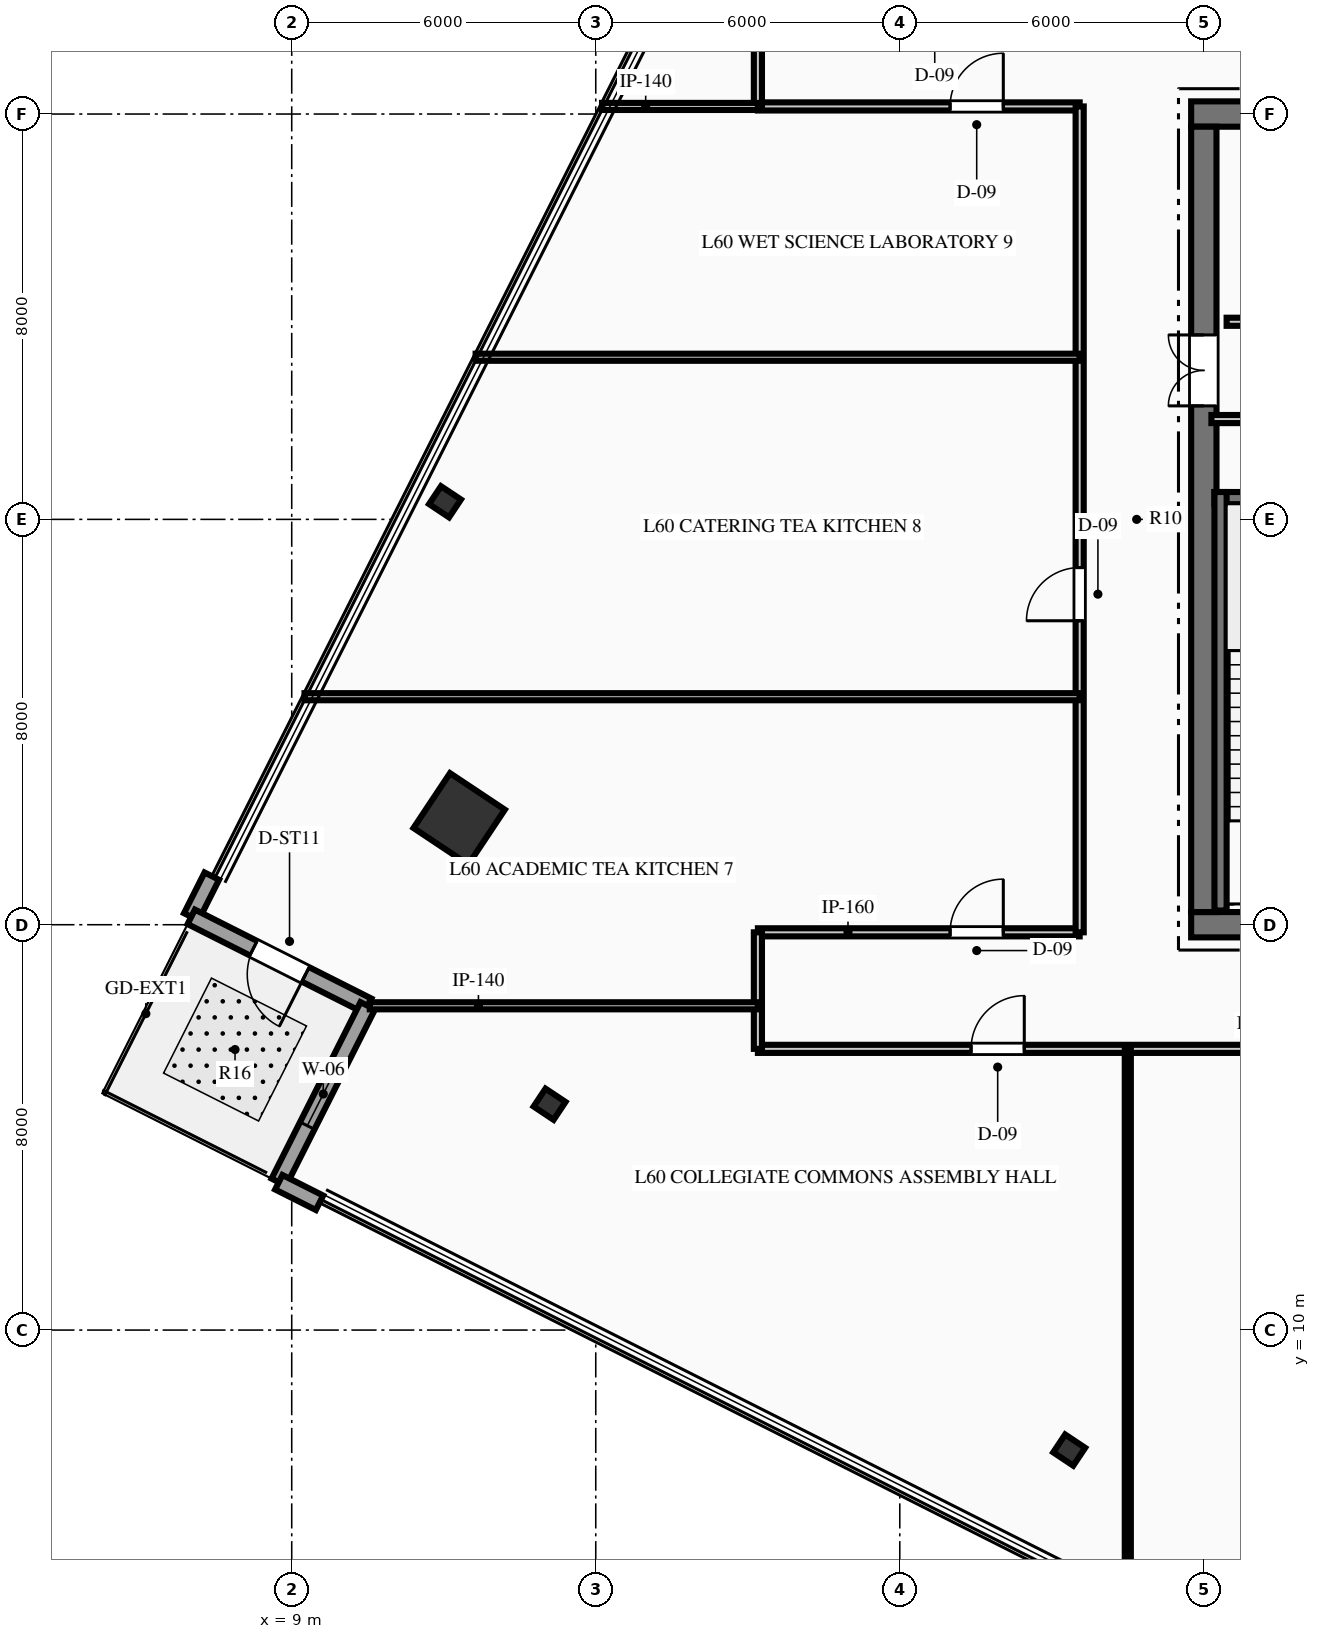
"""IFC4 building model, lengths in metres.
Left out: names, types, materials, properties, quantities, classifications, styles, units other than length and angle.
Written with IfcOpenShell. Run it as: python <this file> out.ifc"""

import sys

from ifc_helpers import new_model, si_unit, direction, frame, frame_2d, origin, origin_2d, place, context, subcontext, project, spatial, rectangle, hollow_rectangle, i_section, extrude, element, fill, save


model = new_model("IFC4")
c1 = context("Model", 3, precision=1e-05, world=origin(), true_north=direction((0.0, 1.0)))
c2 = subcontext(c1, "Body", "Model", "MODEL_VIEW")
j1 = project(units=[si_unit("LENGTHUNIT", "METRE"), si_unit("PLANEANGLEUNIT", "RADIAN")], contexts=[c1])
p1 = place(None, origin())
s1 = spatial("IfcSite", under=j1, at=p1, CompositionType="ELEMENT")
p2 = place(p1, origin())
s2 = spatial("IfcBuilding", under=s1, at=p2, CompositionType="ELEMENT")
p3 = place(p2, frame((0.0, 0.0, 239.7)))
s3 = spatial("IfcBuildingStorey", under=s2, at=p3, CompositionType="ELEMENT", Elevation=239.7)
p4 = place(p3, frame((26.75, 18.0, 0.0), z_axis=(0.0, 0.0, 1.0), x_axis=(1.0, 0.0, 0.0)))
e1 = element("IfcWall", 1, at=p4, inside=s3, PredefinedType="SHEAR", context=c2, shape_type="SweptSolid", body=[
    extrude(rectangle(XDim=18.5, YDim=0.5, at=frame_2d((9.25, 0.0))), origin(), (0.0, 0.0, 1.0), 4.5),
])
p5 = place(p4, frame((7.35, 0.0, 0.0)))
e2 = element("IfcOpeningElement", 2, at=p5, cuts=e1, PredefinedType="OPENING", context=c2, shape_type="SweptSolid", body=[
    extrude(rectangle(XDim=1.1, YDim=2.15, at=frame_2d((0.55, 1.075))), frame((0.0, 0.26, 0.0), z_axis=(0.0, -1.0, 0.0), x_axis=(1.0, 0.0, 0.0)), (0.0, 0.0, 1.0), 0.52),
])
p6 = place(p4, frame((10.05, 0.0, 0.0)))
e3 = element("IfcOpeningElement", 3, at=p6, cuts=e1, PredefinedType="OPENING", context=c2, shape_type="SweptSolid", body=[
    extrude(rectangle(XDim=1.1, YDim=2.15, at=frame_2d((0.55, 1.075))), frame((0.0, 0.26, 0.0), z_axis=(0.0, -1.0, 0.0), x_axis=(1.0, 0.0, 0.0)), (0.0, 0.0, 1.0), 0.52),
])
p7 = place(p3, frame((26.75, 34.0, 0.0), z_axis=(0.0, 0.0, 1.0), x_axis=(1.0, 0.0, 0.0)))
e4 = element("IfcWall", 4, at=p7, inside=s3, PredefinedType="SHEAR", context=c2, shape_type="SweptSolid", body=[
    extrude(rectangle(XDim=18.5, YDim=0.5, at=frame_2d((9.25, 0.0))), origin(), (0.0, 0.0, 1.0), 4.5),
])
p8 = place(p7, frame((13.935, 0.0, 0.0)))
e5 = element("IfcOpeningElement", 5, at=p8, cuts=e4, PredefinedType="OPENING", context=c2, shape_type="SweptSolid", body=[
    extrude(rectangle(XDim=1.1, YDim=2.15, at=frame_2d((0.55, 1.075))), frame((0.0, 0.26, 0.0), z_axis=(0.0, -1.0, 0.0), x_axis=(1.0, 0.0, 0.0)), (0.0, 0.0, 1.0), 0.52),
])
p9 = place(p7, frame((16.185, 0.0, 0.0)))
e6 = element("IfcOpeningElement", 6, at=p9, cuts=e4, PredefinedType="OPENING", context=c2, shape_type="SweptSolid", body=[
    extrude(rectangle(XDim=1.1, YDim=2.15, at=frame_2d((0.55, 1.075))), frame((0.0, 0.26, 0.0), z_axis=(0.0, -1.0, 0.0), x_axis=(1.0, 0.0, 0.0)), (0.0, 0.0, 1.0), 0.52),
])
p10 = place(p3, frame((27.0, 18.25, 0.0), z_axis=(0.0, 0.0, 1.0), x_axis=(0.0, 1.0, 0.0)))
e7 = element("IfcWall", 7, at=p10, inside=s3, PredefinedType="SHEAR", context=c2, shape_type="SweptSolid", body=[
    extrude(rectangle(XDim=15.5, YDim=0.5, at=frame_2d((7.75, 0.0))), origin(), (0.0, 0.0, 1.0), 4.5),
])
p11 = place(p10, frame((9.99, 0.0, 0.0)))
e8 = element("IfcOpeningElement", 8, at=p11, cuts=e7, PredefinedType="OPENING", context=c2, shape_type="SweptSolid", body=[
    extrude(rectangle(XDim=1.4, YDim=2.2, at=frame_2d((0.7, 1.1))), frame((0.0, 0.26, 0.0), z_axis=(0.0, -1.0, 0.0), x_axis=(1.0, 0.0, 0.0)), (0.0, 0.0, 1.0), 0.52),
])
p12 = place(p3, frame((27.21, 26.42, 0.0), z_axis=(0.0, 0.0, 1.0), x_axis=(1.0, 0.0, 0.0)))
e9 = element("IfcWall", 9, at=p12, inside=s3, PredefinedType="SHEAR", context=c2, shape_type="SweptSolid", body=[
    extrude(rectangle(XDim=3.98, YDim=0.24, at=frame_2d((1.99, 0.0))), origin(), (0.0, 0.0, 1.0), 4.5),
])
p13 = place(p3, frame((27.33, 18.28, 0.0), z_axis=(0.0, 0.0, 1.0), x_axis=(0.0, 1.0, 0.0)))
e10 = element("IfcWall", 10, at=p13, inside=s3, PredefinedType="SHEAR", context=c2, shape_type="SweptSolid", body=[
    extrude(rectangle(XDim=8.26, YDim=0.24, at=frame_2d((4.13, 0.0))), origin(), (0.0, 0.0, 1.0), 4.5),
])
p14 = place(p3, frame((12.305, 20.09, 0.0), z_axis=(0.0, 0.0, 1.0), x_axis=(0.554118199338, 0.832437998389, 0.0)))
e11 = element("IfcColumn", 11, at=p14, inside=s3, PredefinedType="COLUMN", context=c2, shape_type="SweptSolid", body=[
    extrude(hollow_rectangle(XDim=1.3, YDim=1.3, WallThickness=0.06, at=origin_2d()), origin(), (0.0, 0.0, 1.0), 4.5),
])
for number, where, z_axis, x_axis in (
    (12, (12.025, 26.347, 0.0), (0.0, 0.0, 1.0), (0.554, 0.832, 0.0)),
    (13, (14.088, 14.458, 0.0), (0.0, 0.0, 1.0), (0.554, 0.832, 0.0)),
    (14, (24.343, 7.631, 0.0), (0.0, 0.0, 1.0), (0.554, 0.832, 0.0)),
):
    element("IfcColumn", number, at=place(p3, frame(where, z_axis=z_axis, x_axis=x_axis)), inside=s3, PredefinedType="COLUMN", context=c2, shape_type="SweptSolid", body=[
        extrude(i_section(OverallWidth=0.424, OverallDepth=0.474, WebThickness=0.048, FlangeThickness=0.077, at=origin_2d()), origin(), (0.0, 0.0, 1.0), 4.5),
    ])
p15 = place(p3, frame((7.017, 18.156, 0.0), z_axis=(0.0, 0.0, 1.0), x_axis=(0.45024883958, 0.892903120421, 0.0)))
e15 = element("IfcWall", 15, at=p15, inside=s3, PredefinedType="STANDARD", context=c2, shape_type="SweptSolid", body=[
    extrude(rectangle(XDim=0.9, YDim=0.32, at=frame_2d((0.45, 0.0))), origin(), (0.0, 0.0, 1.0), 4.1),
])
p16 = place(p3, frame((10.5, 16.4, 0.0), z_axis=(0.0, 0.0, 1.0), x_axis=(-0.892982765682, 0.450090857711, 0.0)))
e16 = element("IfcWall", 16, at=p16, inside=s3, PredefinedType="STANDARD", context=c2, shape_type="SweptSolid", body=[
    extrude(rectangle(XDim=3.9, YDim=0.32, at=frame_2d((1.95, 0.0))), origin(), (0.0, 0.0, 1.0), 4.1),
])
p17 = place(p16, frame((1.375, 0.0, 0.0)))
e17 = element("IfcOpeningElement", 17, at=p17, cuts=e16, PredefinedType="OPENING", context=c2, shape_type="SweptSolid", body=[
    extrude(rectangle(XDim=1.15, YDim=2.2, at=frame_2d((0.575, 1.1))), frame((0.0, 0.17, 0.0), z_axis=(0.0, -1.0, 0.0), x_axis=(1.0, 0.0, 0.0)), (0.0, 0.0, 1.0), 0.34),
])
p18 = place(p3, frame((8.745, 12.917, 0.0), z_axis=(0.0, 0.0, 1.0), x_axis=(0.450090857711, 0.892982765682, 0.0)))
e18 = element("IfcWall", 18, at=p18, inside=s3, PredefinedType="STANDARD", context=c2, shape_type="SweptSolid", body=[
    extrude(rectangle(XDim=3.9, YDim=0.32, at=frame_2d((1.95, 0.0))), origin(), (0.0, 0.0, 1.0), 4.1),
])
p19 = place(p18, frame((1.25, 0.0, 0.85)))
e19 = element("IfcOpeningElement", 19, at=p19, cuts=e18, PredefinedType="OPENING", context=c2, shape_type="SweptSolid", body=[
    extrude(rectangle(XDim=1.4, YDim=2.0, at=frame_2d((0.7, 1.0))), frame((0.0, 0.17, 0.0), z_axis=(0.0, -1.0, 0.0), x_axis=(1.0, 0.0, 0.0)), (0.0, 0.0, 1.0), 0.34),
])
p20 = place(p3, frame((9.548, 12.512, 0.0), z_axis=(0.0, 0.0, 1.0), x_axis=(-0.893012151464, 0.450032551421, 0.0)))
e20 = element("IfcWall", 20, at=p20, inside=s3, PredefinedType="STANDARD", context=c2, shape_type="SweptSolid", body=[
    extrude(rectangle(XDim=0.9, YDim=0.32, at=frame_2d((0.45, 0.0))), origin(), (0.0, 0.0, 1.0), 4.1),
])
p21 = place(p3, frame((27.15, 27.98, 0.0), z_axis=(0.0, 0.0, 1.0), x_axis=(1.0, 0.0, 0.0)))
e21 = element("IfcWall", 21, at=p21, inside=s3, PredefinedType="PARTITIONING", context=c2, shape_type="SweptSolid", body=[
    extrude(rectangle(XDim=4.05, YDim=0.16, at=frame_2d((2.025, 0.0))), origin(), (0.0, 0.0, 1.0), 4.1),
])
p22 = place(p21, frame((1.625, 0.0, 0.0)))
e22 = element("IfcOpeningElement", 22, at=p22, cuts=e21, PredefinedType="OPENING", context=c2, shape_type="SweptSolid", body=[
    extrude(rectangle(XDim=0.95, YDim=2.15, at=frame_2d((0.475, 1.075))), frame((0.0, 0.09, 0.0), z_axis=(0.0, -1.0, 0.0), x_axis=(1.0, 0.0, 0.0)), (0.0, 0.0, 1.0), 0.18),
])
p23 = place(p3, frame((27.45, 29.9, 0.0), z_axis=(0.0, 0.0, 1.0), x_axis=(1.0, 0.0, 0.0)))
e23 = element("IfcWall", 23, at=p23, inside=s3, PredefinedType="PARTITIONING", context=c2, shape_type="SweptSolid", body=[
    extrude(rectangle(XDim=4.43, YDim=0.16, at=frame_2d((2.215, 0.0))), origin(), (0.0, 0.0, 1.0), 4.1),
])
p24 = place(p23, frame((1.675, 0.0, 0.0)))
e24 = element("IfcOpeningElement", 24, at=p24, cuts=e23, PredefinedType="OPENING", context=c2, shape_type="SweptSolid", body=[
    extrude(rectangle(XDim=0.95, YDim=2.15, at=frame_2d((0.475, 1.075))), frame((0.0, 0.09, 0.0), z_axis=(0.0, -1.0, 0.0), x_axis=(1.0, 0.0, 0.0)), (0.0, 0.0, 1.0), 0.18),
])
p25 = place(p3, frame((18.2, 15.55, 0.0), z_axis=(0.0, 0.0, 1.0), x_axis=(1.0, 0.0, 0.0)))
e25 = element("IfcWall", 25, at=p25, inside=s3, PredefinedType="PARTITIONING", context=c2, shape_type="SweptSolid", body=[
    extrude(rectangle(XDim=35.6, YDim=0.16, at=frame_2d((17.8, 0.0))), origin(), (0.0, 0.0, 1.0), 2.595),
])
p26 = place(p25, frame((22.45, 0.0, 0.0)))
e26 = element("IfcOpeningElement", 26, at=p26, cuts=e25, PredefinedType="OPENING", context=c2, shape_type="SweptSolid", body=[
    extrude(rectangle(XDim=0.9, YDim=2.15, at=frame_2d((0.45, 1.075))), frame((0.0, 0.09, 0.0), z_axis=(0.0, -1.0, 0.0), x_axis=(1.0, 0.0, 0.0)), (0.0, 0.0, 1.0), 0.18),
])
p27 = place(p25, frame((24.75, 0.0, 0.0)))
e27 = element("IfcOpeningElement", 27, at=p27, cuts=e25, PredefinedType="OPENING", context=c2, shape_type="SweptSolid", body=[
    extrude(rectangle(XDim=0.9, YDim=2.15, at=frame_2d((0.45, 1.075))), frame((0.0, 0.09, 0.0), z_axis=(0.0, -1.0, 0.0), x_axis=(1.0, 0.0, 0.0)), (0.0, 0.0, 1.0), 0.18),
])
p28 = place(p25, frame((27.0, 0.0, 0.0)))
e28 = element("IfcOpeningElement", 28, at=p28, cuts=e25, PredefinedType="OPENING", context=c2, shape_type="SweptSolid", body=[
    extrude(rectangle(XDim=1.0, YDim=2.15, at=frame_2d((0.5, 1.075))), frame((0.0, 0.09, 0.0), z_axis=(0.0, -1.0, 0.0), x_axis=(1.0, 0.0, 0.0)), (0.0, 0.0, 1.0), 0.18),
])
p29 = place(p25, frame((4.207, 0.0, 0.0)))
e29 = element("IfcOpeningElement", 29, at=p29, cuts=e25, PredefinedType="OPENING", context=c2, shape_type="SweptSolid", body=[
    extrude(rectangle(XDim=1.05, YDim=2.15, at=frame_2d((0.525, 1.075))), frame((0.0, 0.09, 0.0), z_axis=(0.0, -1.0, 0.0), x_axis=(1.0, 0.0, 0.0)), (0.0, 0.0, 1.0), 0.18),
])
p30 = place(p25, frame((16.707, 0.0, 0.0)))
e30 = element("IfcOpeningElement", 30, at=p30, cuts=e25, PredefinedType="OPENING", context=c2, shape_type="SweptSolid", body=[
    extrude(rectangle(XDim=1.05, YDim=2.15, at=frame_2d((0.525, 1.075))), frame((0.0, 0.09, 0.0), z_axis=(0.0, -1.0, 0.0), x_axis=(1.0, 0.0, 0.0)), (0.0, 0.0, 1.0), 0.18),
])
p31 = place(p3, frame((18.2, 17.85, 0.0), z_axis=(0.0, 0.0, 1.0), x_axis=(1.0, 0.0, 0.0)))
e31 = element("IfcWall", 31, at=p31, inside=s3, PredefinedType="PARTITIONING", context=c2, shape_type="SweptSolid", body=[
    extrude(rectangle(XDim=6.35, YDim=0.16, at=frame_2d((3.175, 0.0))), origin(), (0.0, 0.0, 1.0), 4.1),
])
p32 = place(p31, frame((3.793, 0.0, 0.0)))
e32 = element("IfcOpeningElement", 32, at=p32, cuts=e31, PredefinedType="OPENING", context=c2, shape_type="SweptSolid", body=[
    extrude(rectangle(XDim=1.05, YDim=2.15, at=frame_2d((0.525, 1.075))), frame((0.0, 0.09, 0.0), z_axis=(0.0, -1.0, 0.0), x_axis=(1.0, 0.0, 0.0)), (0.0, 0.0, 1.0), 0.18),
])
p33 = place(p3, frame((18.2, 34.15, 0.0), z_axis=(0.0, 0.0, 1.0), x_axis=(1.0, 0.0, 0.0)))
e33 = element("IfcWall", 33, at=p33, inside=s3, PredefinedType="PARTITIONING", context=c2, shape_type="SweptSolid", body=[
    extrude(rectangle(XDim=6.35, YDim=0.16, at=frame_2d((3.175, 0.0))), origin(), (0.0, 0.0, 1.0), 4.1),
])
p34 = place(p33, frame((3.793, 0.0, 0.0)))
e34 = element("IfcOpeningElement", 34, at=p34, cuts=e33, PredefinedType="OPENING", context=c2, shape_type="SweptSolid", body=[
    extrude(rectangle(XDim=1.05, YDim=2.15, at=frame_2d((0.525, 1.075))), frame((0.0, 0.09, 0.0), z_axis=(0.0, -1.0, 0.0), x_axis=(1.0, 0.0, 0.0)), (0.0, 0.0, 1.0), 0.18),
])
p35 = place(p3, frame((24.55, 17.85, 0.0), z_axis=(0.0, 0.0, 1.0), x_axis=(0.0, 1.0, 0.0)))
e35 = element("IfcWall", 35, at=p35, inside=s3, PredefinedType="PARTITIONING", context=c2, shape_type="SweptSolid", body=[
    extrude(rectangle(XDim=16.3, YDim=0.16, at=frame_2d((8.15, 0.0))), origin(), (0.0, 0.0, 1.0), 4.1),
])
p36 = place(p35, frame((6.149, 0.0, 0.0)))
e36 = element("IfcOpeningElement", 36, at=p36, cuts=e35, PredefinedType="OPENING", context=c2, shape_type="SweptSolid", body=[
    extrude(rectangle(XDim=1.05, YDim=2.15, at=frame_2d((0.525, 1.075))), frame((0.0, 0.09, 0.0), z_axis=(0.0, -1.0, 0.0), x_axis=(1.0, 0.0, 0.0)), (0.0, 0.0, 1.0), 0.18),
])
for number, where, z_axis, x_axis in (
    (37, (18.2, 15.55, 0.0), (0.0, 0.0, 1.0), (0.0, 1.0, 0.0)),
    (38, (18.2, 34.15, 0.0), (0.0, 0.0, 1.0), (0.0, 1.0, 0.0)),
):
    element("IfcWall", number, at=place(p3, frame(where, z_axis=z_axis, x_axis=x_axis)), inside=s3, PredefinedType="PARTITIONING", context=c2, shape_type="SweptSolid", body=[
        extrude(rectangle(XDim=2.3, YDim=0.16, at=frame_2d((1.15, 0.0))), origin(), (0.0, 0.0, 1.0), 4.1),
    ])
p37 = place(p3, frame((10.54, 16.4, 0.0), z_axis=(0.0, 0.0, 1.0), x_axis=(1.0, 0.0, 0.0)))
e39 = element("IfcWall", 39, at=p37, inside=s3, PredefinedType="PARTITIONING", context=c2, shape_type="SweptSolid", body=[
    extrude(rectangle(XDim=7.66, YDim=0.14, at=frame_2d((3.83, 0.0))), origin(), (0.0, 0.0, 1.0), 4.1),
])
p38 = place(p3, frame((15.124, 34.15, 0.0), z_axis=(0.0, 0.0, 1.0), x_axis=(1.0, 0.0, 0.0)))
e40 = element("IfcWall", 40, at=p38, inside=s3, PredefinedType="PARTITIONING", context=c2, shape_type="SweptSolid", body=[
    extrude(rectangle(XDim=3.076, YDim=0.14, at=frame_2d((1.538, 0.0))), origin(), (0.0, 0.0, 1.0), 4.1),
])
p39 = place(p3, frame((25.5, 4.517, 0.0), z_axis=(0.0, 0.0, 1.0), x_axis=(0.0, 1.0, 0.0)))
e41 = element("IfcWall", 41, at=p39, inside=s3, PredefinedType="PARTITIONING", context=c2, shape_type="SweptSolid", body=[
    extrude(rectangle(XDim=11.033, YDim=0.12, at=frame_2d((5.517, 0.0))), origin(), (0.0, 0.0, 1.0), 4.1),
])
p40 = place(p3, frame((9.252, 22.5, 0.0), z_axis=(0.0, 0.0, 1.0), x_axis=(1.0, 0.0, 0.0)))
e42 = element("IfcWall", 42, at=p40, inside=s3, PredefinedType="PARTITIONING", context=c2, shape_type="SweptSolid", body=[
    extrude(rectangle(XDim=15.298, YDim=0.14, at=frame_2d((7.649, 0.0))), origin(), (0.0, 0.0, 1.0), 4.1),
])
p41 = place(p3, frame((12.629, 29.2, 0.0), z_axis=(0.0, 0.0, 1.0), x_axis=(1.0, 0.0, 0.0)))
e43 = element("IfcWall", 43, at=p41, inside=s3, PredefinedType="PARTITIONING", context=c2, shape_type="SweptSolid", body=[
    extrude(rectangle(XDim=11.921, YDim=0.14, at=frame_2d((5.96, 0.0))), origin(), (0.0, 0.0, 1.0), 4.1),
])
p42 = place(p17, origin())
e44 = element("IfcDoor", 44, at=p42, inside=s3, OperationType="SINGLE_SWING_LEFT", PredefinedType="DOOR", context=c2, shape_type="SweptSolid", body=[
    extrude(rectangle(XDim=1.15, YDim=2.2, at=frame_2d((0.575, 1.1))), frame((0.0, 0.025, 0.0), z_axis=(0.0, -1.0, 0.0), x_axis=(1.0, 0.0, 0.0)), (0.0, 0.0, 1.0), 0.05),
])
fill(e17, e44)
p43 = place(p19, origin())
e45 = element("IfcWindow", 45, at=p43, inside=s3, PartitioningType="SINGLE_PANEL", PredefinedType="WINDOW", context=c2, shape_type="SweptSolid", body=[
    extrude(rectangle(XDim=1.4, YDim=2.0, at=frame_2d((0.7, 1.0))), frame((0.0, 0.03, 0.0), z_axis=(0.0, -1.0, 0.0), x_axis=(1.0, 0.0, 0.0)), (0.0, 0.0, 1.0), 0.06),
])
fill(e19, e45)
p44 = place(p11, origin())
e46 = element("IfcDoor", 46, at=p44, inside=s3, OperationType="DOUBLE_DOOR_SINGLE_SWING", PredefinedType="DOOR", context=c2, shape_type="SweptSolid", body=[
    extrude(rectangle(XDim=1.4, YDim=2.2, at=frame_2d((0.7, 1.1))), frame((0.0, 0.025, 0.0), z_axis=(0.0, -1.0, 0.0), x_axis=(1.0, 0.0, 0.0)), (0.0, 0.0, 1.0), 0.05),
])
fill(e8, e46)
p45 = place(p29, origin())
e47 = element("IfcDoor", 47, at=p45, inside=s3, OperationType="SINGLE_SWING_RIGHT", PredefinedType="DOOR", context=c2, shape_type="SweptSolid", body=[
    extrude(rectangle(XDim=1.05, YDim=2.15, at=frame_2d((0.525, 1.075))), frame((0.0, 0.025, 0.0), z_axis=(0.0, -1.0, 0.0), x_axis=(1.0, 0.0, 0.0)), (0.0, 0.0, 1.0), 0.05),
])
fill(e29, e47)
p46 = place(p32, origin())
e48 = element("IfcDoor", 48, at=p46, inside=s3, OperationType="SINGLE_SWING_RIGHT", PredefinedType="DOOR", context=c2, shape_type="SweptSolid", body=[
    extrude(rectangle(XDim=1.05, YDim=2.15, at=frame_2d((0.525, 1.075))), frame((0.0, 0.025, 0.0), z_axis=(0.0, -1.0, 0.0), x_axis=(1.0, 0.0, 0.0)), (0.0, 0.0, 1.0), 0.05),
])
fill(e32, e48)
p47 = place(p36, origin())
e49 = element("IfcDoor", 49, at=p47, inside=s3, OperationType="SINGLE_SWING_LEFT", PredefinedType="DOOR", context=c2, shape_type="SweptSolid", body=[
    extrude(rectangle(XDim=1.05, YDim=2.15, at=frame_2d((0.525, 1.075))), frame((0.0, 0.025, 0.0), z_axis=(0.0, -1.0, 0.0), x_axis=(1.0, 0.0, 0.0)), (0.0, 0.0, 1.0), 0.05),
])
fill(e36, e49)
p48 = place(p34, origin())
e50 = element("IfcDoor", 50, at=p48, inside=s3, OperationType="SINGLE_SWING_RIGHT", PredefinedType="DOOR", context=c2, shape_type="SweptSolid", body=[
    extrude(rectangle(XDim=1.05, YDim=2.15, at=frame_2d((0.525, 1.075))), frame((0.0, 0.025, 0.0), z_axis=(0.0, -1.0, 0.0), x_axis=(1.0, 0.0, 0.0)), (0.0, 0.0, 1.0), 0.05),
])
fill(e34, e50)
save(model, sys.argv[1])
